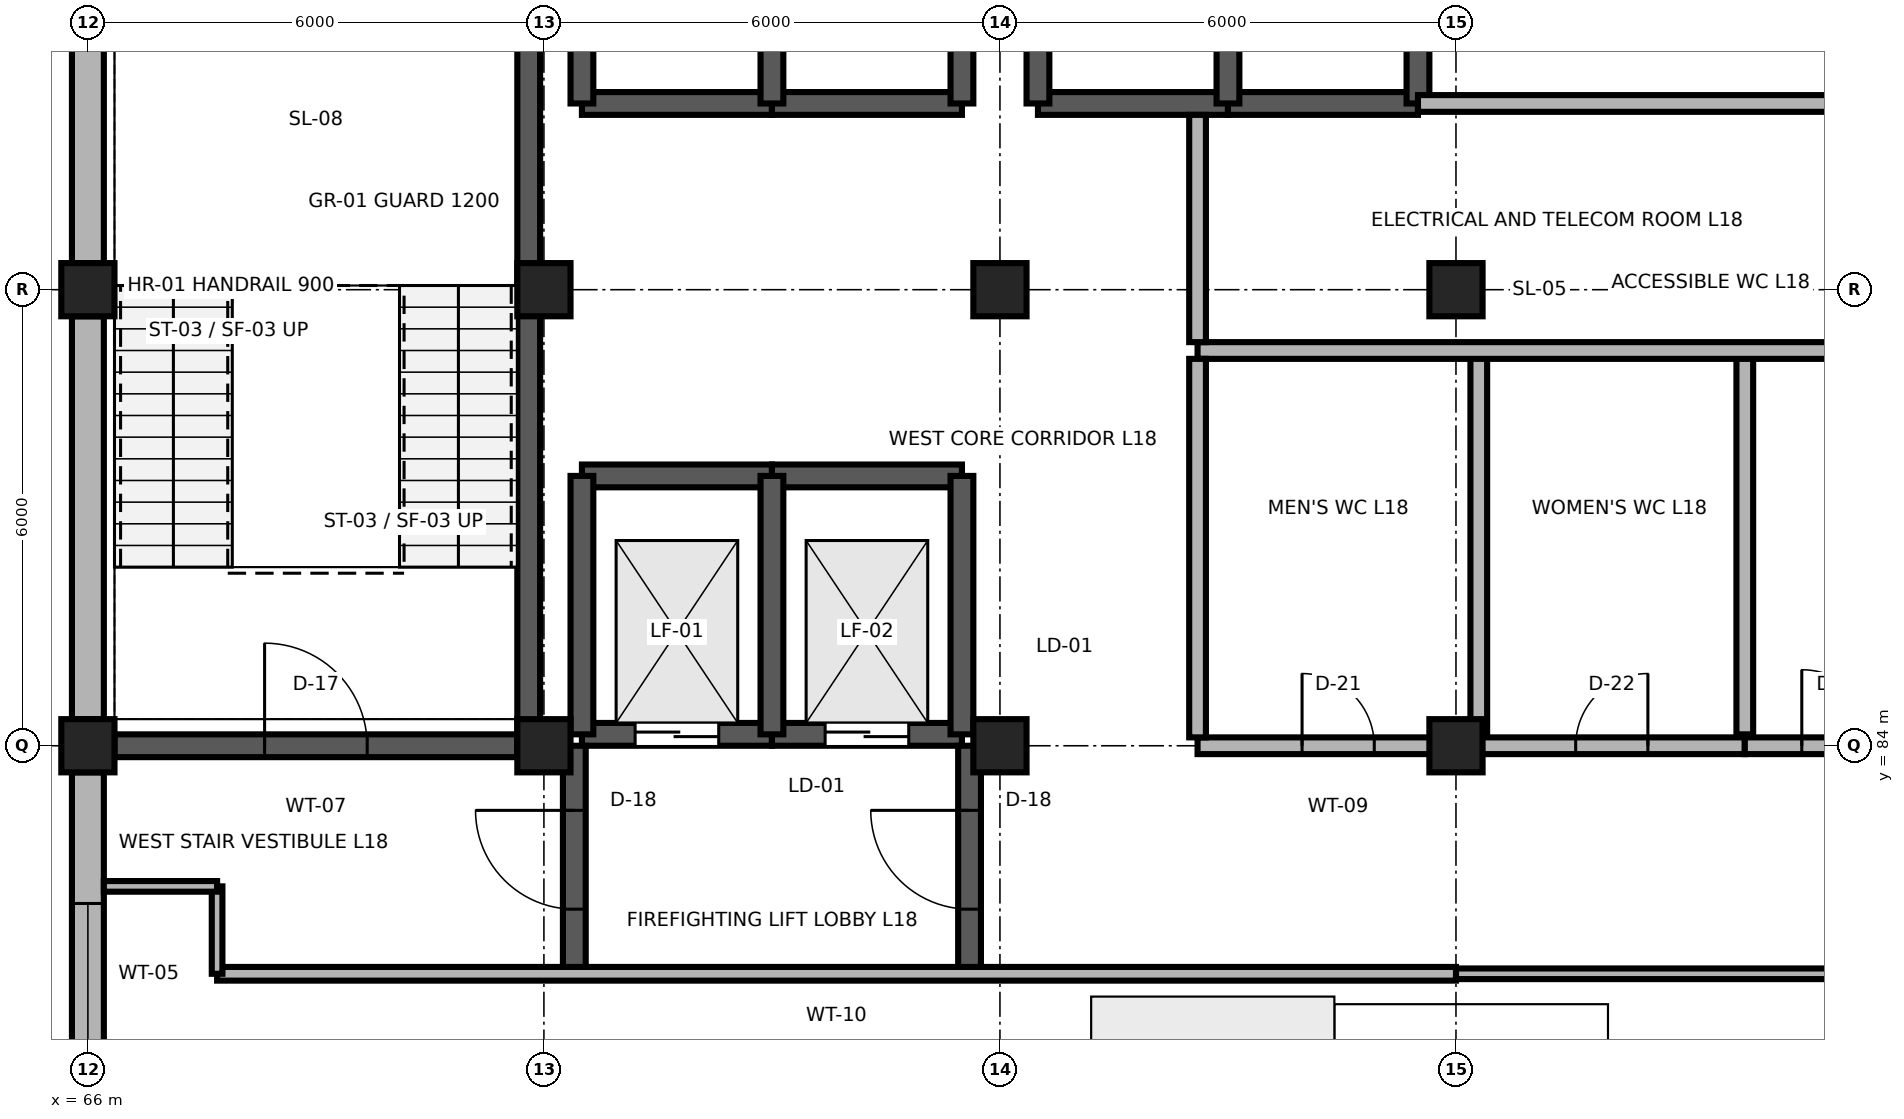
"""IFC4 building model, lengths in metres.
Left out: names, types, materials, properties, quantities, classifications, styles, units other than length and angle.
Written with IfcOpenShell. Run it as: python <this file> out.ifc"""

import sys

from ifc_helpers import new_model, si_unit, direction, frame, frame_2d, origin, origin_2d, place, context, subcontext, project, spatial, rectangle, extrude, element, fill, save


model = new_model("IFC4")
c1 = context("Model", 3, precision=1e-05, world=origin(), true_north=direction((0.0, 1.0)))
c2 = subcontext(c1, "Body", "Model", "MODEL_VIEW")
j1 = project(units=[si_unit("LENGTHUNIT", "METRE"), si_unit("PLANEANGLEUNIT", "RADIAN")], contexts=[c1])
p1 = place(None, origin())
s1 = spatial("IfcSite", under=j1, at=p1, CompositionType="ELEMENT")
p2 = place(p1, origin())
s2 = spatial("IfcBuilding", under=s1, at=p2, CompositionType="ELEMENT")
p3 = place(p2, frame((0.0, 0.0, 72.0)))
s3 = spatial("IfcBuildingStorey", under=s2, at=p3, CompositionType="ELEMENT", Elevation=72.0)
for number, where, z_axis, x_axis in (
    (1, (66.0, 84.0, 0.0), (0.0, 0.0, 1.0), (1.0, 0.0, 0.0)),
    (2, (72.0, 84.0, 0.0), (0.0, 0.0, 1.0), (1.0, 0.0, 0.0)),
    (3, (78.0, 84.0, 0.0), (0.0, 0.0, 1.0), (1.0, 0.0, 0.0)),
    (4, (84.0, 84.0, 0.0), (0.0, 0.0, 1.0), (1.0, 0.0, 0.0)),
    (5, (66.0, 90.0, 0.0), (0.0, 0.0, 1.0), (1.0, 0.0, 0.0)),
    (6, (72.0, 90.0, 0.0), (0.0, 0.0, 1.0), (1.0, 0.0, 0.0)),
    (7, (78.0, 90.0, 0.0), (0.0, 0.0, 1.0), (1.0, 0.0, 0.0)),
    (8, (84.0, 90.0, 0.0), (0.0, 0.0, 1.0), (1.0, 0.0, 0.0)),
):
    element("IfcColumn", number, at=place(p3, frame(where, z_axis=z_axis, x_axis=x_axis)), inside=s3, PredefinedType="COLUMN", context=c2, shape_type="SweptSolid", body=[
        extrude(rectangle(XDim=0.7, YDim=0.7, at=origin_2d()), origin(), (0.0, 0.0, 1.0), 4.3),
    ])
p4 = place(p3, frame((66.0, 78.35, 0.0), z_axis=(0.0, 0.0, 1.0), x_axis=(0.0, 1.0, 0.0)))
e9 = element("IfcWall", 9, at=p4, inside=s3, PredefinedType="SOLIDWALL", context=c2, shape_type="SweptSolid", body=[
    extrude(rectangle(XDim=5.3, YDim=0.42, at=frame_2d((2.65, 0.0))), origin(), (0.0, 0.0, 1.0), 3.88),
])
p5 = place(p4, frame((1.725, 0.0, 0.85)))
e10 = element("IfcOpeningElement", 10, at=p5, cuts=e9, PredefinedType="OPENING", context=c2, shape_type="SweptSolid", body=[
    extrude(rectangle(XDim=1.85, YDim=2.55, at=frame_2d((0.925, 1.275))), frame((0.0, 0.225, 0.0), z_axis=(0.0, -1.0, 0.0), x_axis=(1.0, 0.0, 0.0)), (0.0, 0.0, 1.0), 0.45),
])
for number, where, z_axis, x_axis in (
    (11, (66.0, 84.35, 0.0), (0.0, 0.0, 1.0), (0.0, 1.0, 0.0)),
    (12, (66.0, 90.35, 0.0), (0.0, 0.0, 1.0), (0.0, 1.0, 0.0)),
):
    element("IfcWall", number, at=place(p3, frame(where, z_axis=z_axis, x_axis=x_axis)), inside=s3, PredefinedType="SOLIDWALL", context=c2, shape_type="SweptSolid", body=[
        extrude(rectangle(XDim=5.3, YDim=0.42, at=frame_2d((2.65, 0.0))), origin(), (0.0, 0.0, 1.0), 3.88),
    ])
p6 = place(p3, frame((66.35, 84.0, 0.0), z_axis=(0.0, 0.0, 1.0), x_axis=(1.0, 0.0, 0.0)))
e13 = element("IfcWall", 13, at=p6, inside=s3, PredefinedType="SHEAR", context=c2, shape_type="SweptSolid", body=[
    extrude(rectangle(XDim=5.3, YDim=0.3, at=frame_2d((2.65, 0.0))), origin(), (0.0, 0.0, 1.0), 4.26),
])
p7 = place(p6, frame((1.975, 0.0, 0.0)))
e14 = element("IfcOpeningElement", 14, at=p7, cuts=e13, PredefinedType="OPENING", context=c2, shape_type="SweptSolid", body=[
    extrude(rectangle(XDim=1.35, YDim=2.2, at=frame_2d((0.675, 1.1))), frame((0.0, 0.165, 0.0), z_axis=(0.0, -1.0, 0.0), x_axis=(1.0, 0.0, 0.0)), (0.0, 0.0, 1.0), 0.33),
])
p8 = place(p3, frame((71.8, 84.0, 0.0), z_axis=(0.0, 0.0, 1.0), x_axis=(0.0, 1.0, 0.0)))
e15 = element("IfcWall", 15, at=p8, inside=s3, PredefinedType="SHEAR", context=c2, shape_type="SweptSolid", body=[
    extrude(rectangle(XDim=11.8, YDim=0.3, at=frame_2d((5.9, 0.0))), origin(), (0.0, 0.0, 1.0), 4.3),
])
p9 = place(p3, frame((72.5, 84.15, 0.0), z_axis=(0.0, 0.0, 1.0), x_axis=(1.0, 0.0, 0.0)))
e16 = element("IfcWall", 16, at=p9, inside=s3, PredefinedType="SHEAR", context=c2, shape_type="SweptSolid", body=[
    extrude(rectangle(XDim=2.5, YDim=0.3, at=frame_2d((1.25, 0.0))), origin(), (0.0, 0.0, 1.0), 4.3),
])
p10 = place(p9, frame((0.7, 0.0, 0.0)))
e17 = element("IfcOpeningElement", 17, at=p10, cuts=e16, PredefinedType="OPENING", context=c2, shape_type="SweptSolid", body=[
    extrude(rectangle(XDim=1.1, YDim=2.1, at=frame_2d((0.55, 1.05))), frame((0.0, 0.165, 0.0), z_axis=(0.0, -1.0, 0.0), x_axis=(1.0, 0.0, 0.0)), (0.0, 0.0, 1.0), 0.33),
])
p11 = place(p3, frame((72.5, 87.55, 0.0), z_axis=(0.0, 0.0, 1.0), x_axis=(1.0, 0.0, 0.0)))
e18 = element("IfcWall", 18, at=p11, inside=s3, PredefinedType="SHEAR", context=c2, shape_type="SweptSolid", body=[
    extrude(rectangle(XDim=2.5, YDim=0.3, at=frame_2d((1.25, 0.0))), origin(), (0.0, 0.0, 1.0), 4.3),
])
p12 = place(p3, frame((72.5, 84.15, 0.0), z_axis=(0.0, 0.0, 1.0), x_axis=(0.0, 1.0, 0.0)))
e19 = element("IfcWall", 19, at=p12, inside=s3, PredefinedType="SHEAR", context=c2, shape_type="SweptSolid", body=[
    extrude(rectangle(XDim=3.4, YDim=0.3, at=frame_2d((1.7, 0.0))), origin(), (0.0, 0.0, 1.0), 4.3),
])
p13 = place(p3, frame((75.0, 84.15, 0.0), z_axis=(0.0, 0.0, 1.0), x_axis=(1.0, 0.0, 0.0)))
e20 = element("IfcWall", 20, at=p13, inside=s3, PredefinedType="SHEAR", context=c2, shape_type="SweptSolid", body=[
    extrude(rectangle(XDim=2.5, YDim=0.3, at=frame_2d((1.25, 0.0))), origin(), (0.0, 0.0, 1.0), 4.3),
])
p14 = place(p13, frame((0.7, 0.0, 0.0)))
e21 = element("IfcOpeningElement", 21, at=p14, cuts=e20, PredefinedType="OPENING", context=c2, shape_type="SweptSolid", body=[
    extrude(rectangle(XDim=1.1, YDim=2.1, at=frame_2d((0.55, 1.05))), frame((0.0, 0.165, 0.0), z_axis=(0.0, -1.0, 0.0), x_axis=(1.0, 0.0, 0.0)), (0.0, 0.0, 1.0), 0.33),
])
p15 = place(p3, frame((75.0, 87.55, 0.0), z_axis=(0.0, 0.0, 1.0), x_axis=(1.0, 0.0, 0.0)))
e22 = element("IfcWall", 22, at=p15, inside=s3, PredefinedType="SHEAR", context=c2, shape_type="SweptSolid", body=[
    extrude(rectangle(XDim=2.5, YDim=0.3, at=frame_2d((1.25, 0.0))), origin(), (0.0, 0.0, 1.0), 4.3),
])
for number, where, z_axis, x_axis in (
    (23, (75.0, 84.15, 0.0), (0.0, 0.0, 1.0), (0.0, 1.0, 0.0)),
    (24, (77.5, 84.15, 0.0), (0.0, 0.0, 1.0), (0.0, 1.0, 0.0)),
):
    element("IfcWall", number, at=place(p3, frame(where, z_axis=z_axis, x_axis=x_axis)), inside=s3, PredefinedType="SHEAR", context=c2, shape_type="SweptSolid", body=[
        extrude(rectangle(XDim=3.4, YDim=0.3, at=frame_2d((1.7, 0.0))), origin(), (0.0, 0.0, 1.0), 4.3),
    ])
p16 = place(p3, frame((72.5, 92.45, 0.0), z_axis=(0.0, 0.0, 1.0), x_axis=(1.0, 0.0, 0.0)))
e25 = element("IfcWall", 25, at=p16, inside=s3, PredefinedType="SHEAR", context=c2, shape_type="SweptSolid", body=[
    extrude(rectangle(XDim=2.5, YDim=0.3, at=frame_2d((1.25, 0.0))), origin(), (0.0, 0.0, 1.0), 4.3),
])
p17 = place(p3, frame((72.5, 92.45, 0.0), z_axis=(0.0, 0.0, 1.0), x_axis=(0.0, 1.0, 0.0)))
e26 = element("IfcWall", 26, at=p17, inside=s3, PredefinedType="SHEAR", context=c2, shape_type="SweptSolid", body=[
    extrude(rectangle(XDim=3.4, YDim=0.3, at=frame_2d((1.7, 0.0))), origin(), (0.0, 0.0, 1.0), 4.3),
])
p18 = place(p3, frame((75.0, 92.45, 0.0), z_axis=(0.0, 0.0, 1.0), x_axis=(1.0, 0.0, 0.0)))
e27 = element("IfcWall", 27, at=p18, inside=s3, PredefinedType="SHEAR", context=c2, shape_type="SweptSolid", body=[
    extrude(rectangle(XDim=2.5, YDim=0.3, at=frame_2d((1.25, 0.0))), origin(), (0.0, 0.0, 1.0), 4.3),
])
for number, where, z_axis, x_axis in (
    (28, (75.0, 92.45, 0.0), (0.0, 0.0, 1.0), (0.0, 1.0, 0.0)),
    (29, (77.5, 92.45, 0.0), (0.0, 0.0, 1.0), (0.0, 1.0, 0.0)),
):
    element("IfcWall", number, at=place(p3, frame(where, z_axis=z_axis, x_axis=x_axis)), inside=s3, PredefinedType="SHEAR", context=c2, shape_type="SweptSolid", body=[
        extrude(rectangle(XDim=3.4, YDim=0.3, at=frame_2d((1.7, 0.0))), origin(), (0.0, 0.0, 1.0), 4.3),
    ])
p19 = place(p3, frame((78.5, 92.45, 0.0), z_axis=(0.0, 0.0, 1.0), x_axis=(1.0, 0.0, 0.0)))
e30 = element("IfcWall", 30, at=p19, inside=s3, PredefinedType="SHEAR", context=c2, shape_type="SweptSolid", body=[
    extrude(rectangle(XDim=2.5, YDim=0.3, at=frame_2d((1.25, 0.0))), origin(), (0.0, 0.0, 1.0), 4.3),
])
p20 = place(p3, frame((78.5, 92.45, 0.0), z_axis=(0.0, 0.0, 1.0), x_axis=(0.0, 1.0, 0.0)))
e31 = element("IfcWall", 31, at=p20, inside=s3, PredefinedType="SHEAR", context=c2, shape_type="SweptSolid", body=[
    extrude(rectangle(XDim=3.4, YDim=0.3, at=frame_2d((1.7, 0.0))), origin(), (0.0, 0.0, 1.0), 4.3),
])
p21 = place(p3, frame((81.0, 92.45, 0.0), z_axis=(0.0, 0.0, 1.0), x_axis=(1.0, 0.0, 0.0)))
e32 = element("IfcWall", 32, at=p21, inside=s3, PredefinedType="SHEAR", context=c2, shape_type="SweptSolid", body=[
    extrude(rectangle(XDim=2.5, YDim=0.3, at=frame_2d((1.25, 0.0))), origin(), (0.0, 0.0, 1.0), 4.3),
])
for number, where, z_axis, x_axis in (
    (33, (81.0, 92.45, 0.0), (0.0, 0.0, 1.0), (0.0, 1.0, 0.0)),
    (34, (83.5, 92.45, 0.0), (0.0, 0.0, 1.0), (0.0, 1.0, 0.0)),
):
    element("IfcWall", number, at=place(p3, frame(where, z_axis=z_axis, x_axis=x_axis)), inside=s3, PredefinedType="SHEAR", context=c2, shape_type="SweptSolid", body=[
        extrude(rectangle(XDim=3.4, YDim=0.3, at=frame_2d((1.7, 0.0))), origin(), (0.0, 0.0, 1.0), 4.3),
    ])
p22 = place(p3, frame((72.4, 81.0, 0.0), z_axis=(0.0, 0.0, 1.0), x_axis=(0.0, 1.0, 0.0)))
e35 = element("IfcWall", 35, at=p22, inside=s3, PredefinedType="SHEAR", context=c2, shape_type="SweptSolid", body=[
    extrude(rectangle(XDim=3.0, YDim=0.3, at=frame_2d((1.5, 0.0))), origin(), (0.0, 0.0, 1.0), 4.3),
])
p23 = place(p22, frame((0.85, 0.0, 0.0)))
e36 = element("IfcOpeningElement", 36, at=p23, cuts=e35, PredefinedType="OPENING", context=c2, shape_type="SweptSolid", body=[
    extrude(rectangle(XDim=1.3, YDim=2.2, at=frame_2d((0.65, 1.1))), frame((0.0, 0.165, 0.0), z_axis=(0.0, -1.0, 0.0), x_axis=(1.0, 0.0, 0.0)), (0.0, 0.0, 1.0), 0.33),
])
p24 = place(p3, frame((77.6, 81.0, 0.0), z_axis=(0.0, 0.0, 1.0), x_axis=(0.0, 1.0, 0.0)))
e37 = element("IfcWall", 37, at=p24, inside=s3, PredefinedType="SHEAR", context=c2, shape_type="SweptSolid", body=[
    extrude(rectangle(XDim=3.0, YDim=0.3, at=frame_2d((1.5, 0.0))), origin(), (0.0, 0.0, 1.0), 4.3),
])
p25 = place(p24, frame((0.85, 0.0, 0.0)))
e38 = element("IfcOpeningElement", 38, at=p25, cuts=e37, PredefinedType="OPENING", context=c2, shape_type="SweptSolid", body=[
    extrude(rectangle(XDim=1.3, YDim=2.2, at=frame_2d((0.65, 1.1))), frame((0.0, 0.165, 0.0), z_axis=(0.0, -1.0, 0.0), x_axis=(1.0, 0.0, 0.0)), (0.0, 0.0, 1.0), 0.33),
])
p26 = place(p3, frame((80.6, 84.0, 0.0), z_axis=(0.0, 0.0, 1.0), x_axis=(1.0, 0.0, 0.0)))
e39 = element("IfcWall", 39, at=p26, inside=s3, PredefinedType="PARTITIONING", context=c2, shape_type="SweptSolid", body=[
    extrude(rectangle(XDim=3.7, YDim=0.22, at=frame_2d((1.85, 0.0))), origin(), (0.0, 0.0, 1.0), 4.056),
])
p27 = place(p26, frame((1.375, 0.0, 0.0)))
e40 = element("IfcOpeningElement", 40, at=p27, cuts=e39, PredefinedType="OPENING", context=c2, shape_type="SweptSolid", body=[
    extrude(rectangle(XDim=0.95, YDim=2.15, at=frame_2d((0.475, 1.075))), frame((0.0, 0.125, 0.0), z_axis=(0.0, -1.0, 0.0), x_axis=(1.0, 0.0, 0.0)), (0.0, 0.0, 1.0), 0.25),
])
p28 = place(p3, frame((84.3, 84.0, 0.0), z_axis=(0.0, 0.0, 1.0), x_axis=(1.0, 0.0, 0.0)))
e41 = element("IfcWall", 41, at=p28, inside=s3, PredefinedType="PARTITIONING", context=c2, shape_type="SweptSolid", body=[
    extrude(rectangle(XDim=3.5, YDim=0.22, at=frame_2d((1.75, 0.0))), origin(), (0.0, 0.0, 1.0), 4.056),
])
p29 = place(p28, frame((1.275, 0.0, 0.0)))
e42 = element("IfcOpeningElement", 42, at=p29, cuts=e41, PredefinedType="OPENING", context=c2, shape_type="SweptSolid", body=[
    extrude(rectangle(XDim=0.95, YDim=2.1, at=frame_2d((0.475, 1.05))), frame((0.0, 0.125, 0.0), z_axis=(0.0, -1.0, 0.0), x_axis=(1.0, 0.0, 0.0)), (0.0, 0.0, 1.0), 0.25),
])
p30 = place(p3, frame((87.8, 84.0, 0.0), z_axis=(0.0, 0.0, 1.0), x_axis=(1.0, 0.0, 0.0)))
e43 = element("IfcWall", 43, at=p30, inside=s3, PredefinedType="PARTITIONING", context=c2, shape_type="SweptSolid", body=[
    extrude(rectangle(XDim=2.5, YDim=0.22, at=frame_2d((1.25, 0.0))), origin(), (0.0, 0.0, 1.0), 4.056),
])
p31 = place(p30, frame((0.75, 0.0, 0.0)))
e44 = element("IfcOpeningElement", 44, at=p31, cuts=e43, PredefinedType="OPENING", context=c2, shape_type="SweptSolid", body=[
    extrude(rectangle(XDim=1.0, YDim=2.15, at=frame_2d((0.5, 1.075))), frame((0.0, 0.125, 0.0), z_axis=(0.0, -1.0, 0.0), x_axis=(1.0, 0.0, 0.0)), (0.0, 0.0, 1.0), 0.25),
])
for number, where, z_axis, x_axis in (
    (45, (84.3, 84.15, 0.0), (0.0, 0.0, 1.0), (0.0, 1.0, 0.0)),
    (46, (87.8, 84.15, 0.0), (0.0, 0.0, 1.0), (0.0, 1.0, 0.0)),
):
    element("IfcWall", number, at=place(p3, frame(where, z_axis=z_axis, x_axis=x_axis)), inside=s3, PredefinedType="PARTITIONING", context=c2, shape_type="SweptSolid", body=[
        extrude(rectangle(XDim=5.0, YDim=0.22, at=frame_2d((2.5, 0.0))), origin(), (0.0, 0.0, 1.0), 4.3),
    ])
p32 = place(p3, frame((80.6, 89.2, 0.0), z_axis=(0.0, 0.0, 1.0), x_axis=(1.0, 0.0, 0.0)))
e47 = element("IfcWall", 47, at=p32, inside=s3, PredefinedType="PARTITIONING", context=c2, shape_type="SweptSolid", body=[
    extrude(rectangle(XDim=9.87, YDim=0.22, at=frame_2d((4.935, 0.0))), origin(), (0.0, 0.0, 1.0), 4.3),
])
p33 = place(p3, frame((84.0, 81.0, 0.0), z_axis=(0.0, 0.0, 1.0), x_axis=(1.0, 0.0, 0.0)))
e48 = element("IfcWall", 48, at=p33, inside=s3, PredefinedType="PARTITIONING", context=c2, shape_type="SweptSolid", body=[
    extrude(rectangle(XDim=12.0, YDim=0.14, at=frame_2d((6.0, 0.0))), origin(), (0.0, 0.0, 1.0), 4.3),
])
p34 = place(p33, frame((4.975, 0.0, 0.0)))
e49 = element("IfcOpeningElement", 49, at=p34, cuts=e48, PredefinedType="OPENING", context=c2, shape_type="SweptSolid", body=[
    extrude(rectangle(XDim=2.05, YDim=2.85, at=frame_2d((1.025, 1.425))), frame((0.0, 0.085, 0.0), z_axis=(0.0, -1.0, 0.0), x_axis=(1.0, 0.0, 0.0)), (0.0, 0.0, 1.0), 0.17),
])
p35 = place(p3, frame((80.6, 84.11, 0.0), z_axis=(0.0, 0.0, 1.0), x_axis=(0.0, 1.0, 0.0)))
e50 = element("IfcWall", 50, at=p35, inside=s3, PredefinedType="PARTITIONING", context=c2, shape_type="SweptSolid", body=[
    extrude(rectangle(XDim=4.98, YDim=0.22, at=frame_2d((2.49, 0.0))), origin(), (0.0, 0.0, 1.0), 4.3),
])
p36 = place(p3, frame((80.6, 89.31, 0.0), z_axis=(0.0, 0.0, 1.0), x_axis=(0.0, 1.0, 0.0)))
e51 = element("IfcWall", 51, at=p36, inside=s3, PredefinedType="PARTITIONING", context=c2, shape_type="SweptSolid", body=[
    extrude(rectangle(XDim=2.99, YDim=0.22, at=frame_2d((1.495, 0.0))), origin(), (0.0, 0.0, 1.0), 4.3),
])
p37 = place(p3, frame((83.5, 92.45, 0.0), z_axis=(0.0, 0.0, 1.0), x_axis=(1.0, 0.0, 0.0)))
e52 = element("IfcWall", 52, at=p37, inside=s3, PredefinedType="PARTITIONING", context=c2, shape_type="SweptSolid", body=[
    extrude(rectangle(XDim=6.97, YDim=0.22, at=frame_2d((3.485, 0.0))), origin(), (0.0, 0.0, 1.0), 4.3),
])
p38 = place(p3, frame((67.7, 81.0, 0.0), z_axis=(0.0, 0.0, 1.0), x_axis=(1.0, 0.0, 0.0)))
e53 = element("IfcWall", 53, at=p38, inside=s3, PredefinedType="PARTITIONING", context=c2, shape_type="SweptSolid", body=[
    extrude(rectangle(XDim=16.3, YDim=0.18, at=frame_2d((8.15, 0.0))), origin(), (0.0, 0.0, 1.0), 4.3),
])
p39 = place(p3, frame((67.7, 81.0, 0.0), z_axis=(0.0, 0.0, 1.0), x_axis=(0.0, 1.0, 0.0)))
e54 = element("IfcWall", 54, at=p39, inside=s3, PredefinedType="PARTITIONING", context=c2, shape_type="SweptSolid", body=[
    extrude(rectangle(XDim=1.15, YDim=0.14, at=frame_2d((0.575, 0.0))), origin(), (0.0, 0.0, 1.0), 4.3),
])
p40 = place(p3, frame((67.7, 82.15, 0.0), z_axis=(0.0, 0.0, 1.0), x_axis=(-1.0, 0.0, 0.0)))
e55 = element("IfcWall", 55, at=p40, inside=s3, PredefinedType="PARTITIONING", context=c2, shape_type="SweptSolid", body=[
    extrude(rectangle(XDim=1.49, YDim=0.14, at=frame_2d((0.745, 0.0))), origin(), (0.0, 0.0, 1.0), 4.3),
])
p41 = place(p5, origin())
e56 = element("IfcWindow", 56, at=p41, inside=s3, PartitioningType="SINGLE_PANEL", PredefinedType="WINDOW", context=c2, shape_type="SweptSolid", body=[
    extrude(rectangle(XDim=1.85, YDim=2.55, at=frame_2d((0.925, 1.275))), frame((0.0, 0.03, 0.0), z_axis=(0.0, -1.0, 0.0), x_axis=(1.0, 0.0, 0.0)), (0.0, 0.0, 1.0), 0.06),
])
fill(e10, e56)
p42 = place(p7, origin())
e57 = element("IfcDoor", 57, at=p42, inside=s3, OperationType="SINGLE_SWING_LEFT", PredefinedType="DOOR", context=c2, shape_type="SweptSolid", body=[
    extrude(rectangle(XDim=1.35, YDim=2.2, at=frame_2d((0.675, 1.1))), frame((0.0, 0.025, 0.0), z_axis=(0.0, -1.0, 0.0), x_axis=(1.0, 0.0, 0.0)), (0.0, 0.0, 1.0), 0.05),
])
fill(e14, e57)
p43 = place(p10, origin())
e58 = element("IfcDoor", 58, at=p43, inside=s3, OperationType="DOUBLE_DOOR_SLIDING", PredefinedType="DOOR", context=c2, shape_type="SweptSolid", body=[
    extrude(rectangle(XDim=1.1, YDim=2.1, at=frame_2d((0.55, 1.05))), frame((0.0, 0.025, 0.0), z_axis=(0.0, -1.0, 0.0), x_axis=(1.0, 0.0, 0.0)), (0.0, 0.0, 1.0), 0.05),
])
fill(e17, e58)
p44 = place(p14, origin())
e59 = element("IfcDoor", 59, at=p44, inside=s3, OperationType="DOUBLE_DOOR_SLIDING", PredefinedType="DOOR", context=c2, shape_type="SweptSolid", body=[
    extrude(rectangle(XDim=1.1, YDim=2.1, at=frame_2d((0.55, 1.05))), frame((0.0, 0.025, 0.0), z_axis=(0.0, -1.0, 0.0), x_axis=(1.0, 0.0, 0.0)), (0.0, 0.0, 1.0), 0.05),
])
fill(e21, e59)
p45 = place(p23, origin())
e60 = element("IfcDoor", 60, at=p45, inside=s3, OperationType="SINGLE_SWING_RIGHT", PredefinedType="DOOR", context=c2, shape_type="SweptSolid", body=[
    extrude(rectangle(XDim=1.3, YDim=2.2, at=frame_2d((0.65, 1.1))), frame((0.0, 0.025, 0.0), z_axis=(0.0, -1.0, 0.0), x_axis=(1.0, 0.0, 0.0)), (0.0, 0.0, 1.0), 0.05),
])
fill(e36, e60)
p46 = place(p25, origin())
e61 = element("IfcDoor", 61, at=p46, inside=s3, OperationType="SINGLE_SWING_RIGHT", PredefinedType="DOOR", context=c2, shape_type="SweptSolid", body=[
    extrude(rectangle(XDim=1.3, YDim=2.2, at=frame_2d((0.65, 1.1))), frame((0.0, 0.025, 0.0), z_axis=(0.0, -1.0, 0.0), x_axis=(1.0, 0.0, 0.0)), (0.0, 0.0, 1.0), 0.05),
])
fill(e38, e61)
p47 = place(p27, origin())
e62 = element("IfcDoor", 62, at=p47, inside=s3, OperationType="SINGLE_SWING_LEFT", PredefinedType="DOOR", context=c2, shape_type="SweptSolid", body=[
    extrude(rectangle(XDim=0.95, YDim=2.15, at=frame_2d((0.475, 1.075))), frame((0.0, 0.025, 0.0), z_axis=(0.0, -1.0, 0.0), x_axis=(1.0, 0.0, 0.0)), (0.0, 0.0, 1.0), 0.05),
])
fill(e40, e62)
p48 = place(p29, origin())
e63 = element("IfcDoor", 63, at=p48, inside=s3, OperationType="SINGLE_SWING_RIGHT", PredefinedType="DOOR", context=c2, shape_type="SweptSolid", body=[
    extrude(rectangle(XDim=0.95, YDim=2.1, at=frame_2d((0.475, 1.05))), frame((0.0, 0.025, 0.0), z_axis=(0.0, -1.0, 0.0), x_axis=(1.0, 0.0, 0.0)), (0.0, 0.0, 1.0), 0.05),
])
fill(e42, e63)
p49 = place(p31, origin())
e64 = element("IfcDoor", 64, at=p49, inside=s3, OperationType="SINGLE_SWING_LEFT", PredefinedType="DOOR", context=c2, shape_type="SweptSolid", body=[
    extrude(rectangle(XDim=1.0, YDim=2.15, at=frame_2d((0.5, 1.075))), frame((0.0, 0.025, 0.0), z_axis=(0.0, -1.0, 0.0), x_axis=(1.0, 0.0, 0.0)), (0.0, 0.0, 1.0), 0.05),
])
fill(e44, e64)
save(model, sys.argv[1])
